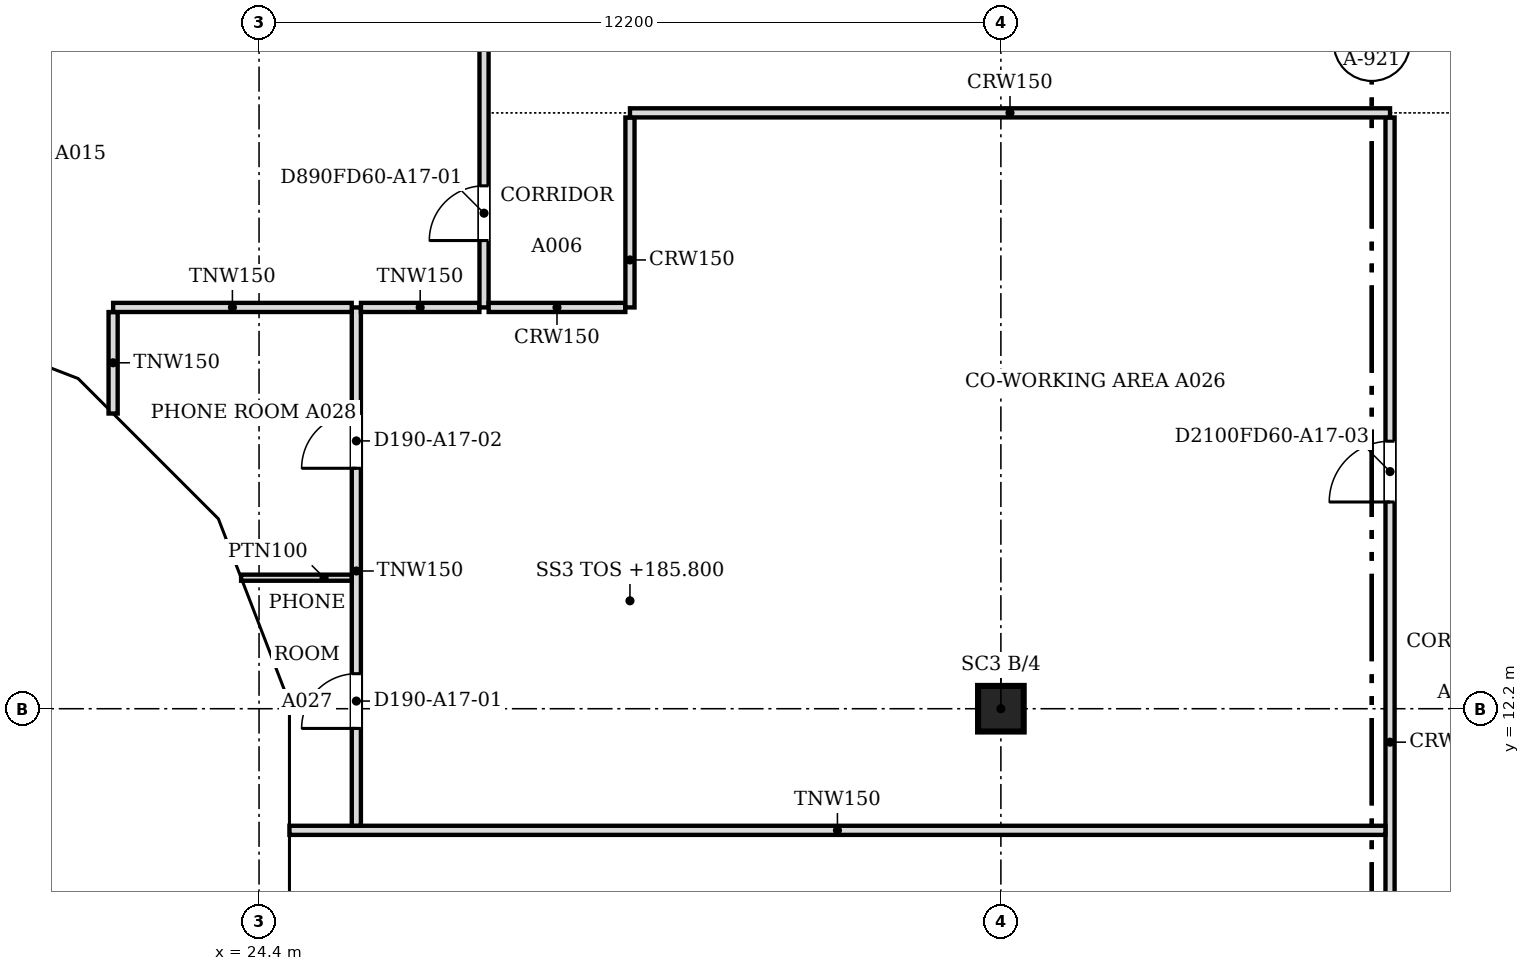
"""IFC4 building model, lengths in metres.
Left out: names, types, materials, properties, quantities, classifications, styles, units other than length and angle.
Written with IfcOpenShell. Run it as: python <this file> out.ifc"""

import sys

from ifc_helpers import new_model, si_unit, direction, frame, frame_2d, origin, origin_2d, place, context, subcontext, project, spatial, polyline, rectangle, outline, extrude, faceted_brep, source, transform, mapped, element, fill, save


model = new_model("IFC4")
c1 = context("Model", 3, precision=1e-05, world=origin(), true_north=direction((0.0, 1.0)))
c2 = subcontext(c1, "Body", "Model", "MODEL_VIEW")
j1 = project(units=[si_unit("LENGTHUNIT", "METRE"), si_unit("PLANEANGLEUNIT", "RADIAN")], contexts=[c1])
p1 = place(None, origin())
s1 = spatial("IfcSite", under=j1, at=p1, CompositionType="ELEMENT")
p2 = place(p1, origin())
s2 = spatial("IfcBuilding", under=s1, at=p2, CompositionType="ELEMENT")
p3 = place(p2, frame((0.0, 0.0, 185.8)))
s3 = spatial("IfcBuildingStorey", under=s2, at=p3, CompositionType="ELEMENT", Elevation=185.8)
p4 = place(p3, frame((36.6, 12.2, 0.0), z_axis=(0.0, 0.0, 1.0), x_axis=(1.0, 0.0, 0.0)))
e1 = element("IfcColumn", 1, at=p4, inside=s3, PredefinedType="COLUMN", context=c2, shape_type="SweptSolid", body=[
    extrude(rectangle(XDim=0.75, YDim=0.75, at=origin_2d()), origin(), (0.0, 0.0, 1.0), 3.6),
])
m1 = source(origin(), c2, "Body", "Brep", [
    faceted_brep([(0.093, -0.25, 0.056), (3.143, -0.25, 3.736), (3.143, -0.25, 3.864), (0.093, -0.25, 7.544), (0.0, 0.25, 7.543), (0.047, 0.25, 7.6), (3.196, 0.25, 3.8), (0.047, 0.25, 0.0), (0.0, 0.25, 0.057), (3.196, -0.0, 3.8), (0.047, 0.0, 0.0), (0.047, 0.0, 7.6)], [[[0, 1, 2, 3]], [[4, 5, 6, 7, 8]], [[7, 6, 9, 1, 0, 10]], [[6, 5, 11, 3, 2, 9]], [[5, 4, 11]], [[8, 7, 10]], [[8, 10, 0, 3, 11, 4]], [[1, 9, 2]]]),
])
p5 = place(p3, frame((18.303, 18.567, -3.8), z_axis=(0.0, 0.0, 1.0), x_axis=(0.932978940178, -0.359930961693, 0.0)))
e2 = element("IfcWall", 2, at=p5, inside=s3, PredefinedType="SOLIDWALL", context=c2, shape_type="MappedRepresentation", body=[
    mapped(m1, transform((0.0, 0.0, 0.0), scale=1.0)),
])
m2 = source(origin(), c2, "Body", "SweptSolid", [
    extrude(outline(polyline([(0.247, 0.633), (2.871, 3.8), (0.247, 6.967), (0.247, 0.633)])), frame((0.0, 0.26, 0.0), z_axis=(0.0, -1.0, 0.0), x_axis=(1.0, 0.0, 0.0)), (0.0, 0.0, 1.0), 0.52),
])
p6 = place(p5, origin())
e3 = element("IfcOpeningElement", 3, at=p6, cuts=e2, PredefinedType="OPENING", context=c2, shape_type="MappedRepresentation", body=[
    mapped(m2, transform((0.0, 0.0, 0.0), scale=1.0)),
])
m3 = source(origin(), c2, "Body", "Brep", [
    faceted_brep([(3.103, -0.25, 7.536), (0.053, -0.25, 3.864), (0.053, -0.25, 3.736), (3.103, -0.25, 0.064), (0.0, 0.25, 3.8), (3.156, 0.25, 7.6), (3.209, 0.25, 7.536), (3.209, 0.25, 0.064), (3.156, 0.25, 0.0), (3.156, -0.0, 0.0), (3.156, -0.0, 7.6), (0.0, 0.0, 3.8)], [[[0, 1, 2, 3]], [[4, 5, 6, 7, 8]], [[8, 7, 9]], [[6, 5, 10]], [[5, 4, 11, 1, 0, 10]], [[4, 8, 9, 3, 2, 11]], [[11, 2, 1]], [[3, 9, 7, 6, 10, 0]]]),
])
p7 = place(p3, frame((21.285, 17.417, -3.8), z_axis=(0.0, 0.0, 1.0), x_axis=(0.707106781187, -0.707106781187, 0.0)))
e4 = element("IfcWall", 4, at=p7, inside=s3, PredefinedType="SOLIDWALL", context=c2, shape_type="MappedRepresentation", body=[
    mapped(m3, transform((0.0, 0.0, 0.0), scale=1.0)),
])
m4 = source(origin(), c2, "Body", "SweptSolid", [
    extrude(outline(polyline([(2.956, 6.968), (0.325, 3.8), (2.956, 0.632), (2.956, 6.968)])), frame((0.0, 0.26, 0.0), z_axis=(0.0, -1.0, 0.0), x_axis=(1.0, 0.0, 0.0)), (0.0, 0.0, 1.0), 0.52),
])
p8 = place(p7, origin())
e5 = element("IfcOpeningElement", 5, at=p8, cuts=e4, PredefinedType="OPENING", context=c2, shape_type="MappedRepresentation", body=[
    mapped(m4, transform((0.0, 0.0, 0.0), scale=1.0)),
])
m5 = source(origin(), c2, "Body", "Brep", [
    faceted_brep([(0.106, -0.25, 0.064), (3.156, -0.25, 3.744), (3.156, -0.25, 3.856), (0.106, -0.25, 7.536), (0.0, 0.25, 7.536), (0.053, 0.25, 7.6), (3.202, 0.25, 3.8), (0.053, 0.25, 0.0), (0.0, 0.25, 0.064), (3.202, -0.0, 3.8), (0.053, 0.0, 0.0), (0.053, 0.0, 7.6)], [[[0, 1, 2, 3]], [[4, 5, 6, 7, 8]], [[7, 6, 9, 1, 0, 10]], [[6, 5, 11, 3, 2, 9]], [[5, 4, 11]], [[8, 7, 10]], [[8, 10, 0, 3, 11, 4]], [[1, 9, 2]]]),
])
p9 = place(p3, frame((23.497, 15.234, -3.8), z_axis=(0.0, 0.0, 1.0), x_axis=(0.359913782069, -0.932985567668, 0.0)))
e6 = element("IfcWall", 6, at=p9, inside=s3, PredefinedType="SOLIDWALL", context=c2, shape_type="MappedRepresentation", body=[
    mapped(m5, transform((0.0, 0.0, 0.0), scale=1.0)),
])
m6 = source(origin(), c2, "Body", "SweptSolid", [
    extrude(outline(polyline([(0.253, 0.633), (2.878, 3.8), (0.253, 6.967), (0.253, 0.633)])), frame((0.0, 0.26, 0.0), z_axis=(0.0, -1.0, 0.0), x_axis=(1.0, 0.0, 0.0)), (0.0, 0.0, 1.0), 0.52),
])
p10 = place(p9, origin())
e7 = element("IfcOpeningElement", 7, at=p10, cuts=e6, PredefinedType="OPENING", context=c2, shape_type="MappedRepresentation", body=[
    mapped(m6, transform((0.0, 0.0, 0.0), scale=1.0)),
])
m7 = source(origin(), c2, "Body", "Brep", [
    faceted_brep([(3.096, -0.25, 0.0), (6.1, -0.25, 3.8), (3.096, -0.25, 7.6), (0.047, -0.25, 3.857), (0.047, -0.25, 3.743), (0.0, 0.25, 3.8), (3.096, 0.25, 7.6), (6.053, 0.25, 3.859), (6.053, 0.25, 3.741), (3.096, 0.25, 0.0), (6.1, -0.0, 3.8), (0.0, 0.0, 3.8)], [[[0, 1, 2, 3, 4]], [[5, 6, 7, 8, 9]], [[9, 8, 10, 1, 0]], [[7, 6, 2, 1, 10]], [[6, 5, 11, 3, 2]], [[5, 9, 0, 4, 11]], [[11, 4, 3]], [[10, 8, 7]]]),
])
p11 = place(p3, frame((24.65, 12.247, -3.8), z_axis=(0.0, 0.0, 1.0), x_axis=(0.0, -1.0, 0.0)))
e8 = element("IfcWall", 8, at=p11, inside=s3, PredefinedType="SOLIDWALL", context=c2, shape_type="MappedRepresentation", body=[
    mapped(m7, transform((0.0, 0.0, 0.0), scale=1.0)),
])
m8 = source(origin(), c2, "Body", "SweptSolid", [
    extrude(outline(polyline([(3.094, 0.399), (5.781, 3.8), (3.094, 7.201), (0.323, 3.8), (3.094, 0.399)])), frame((0.0, 0.26, 0.0), z_axis=(0.0, -1.0, 0.0), x_axis=(1.0, 0.0, 0.0)), (0.0, 0.0, 1.0), 0.52),
])
p12 = place(p11, origin())
e9 = element("IfcOpeningElement", 9, at=p12, cuts=e8, PredefinedType="OPENING", context=c2, shape_type="MappedRepresentation", body=[
    mapped(m8, transform((0.0, 0.0, 0.0), scale=1.0)),
])
p13 = place(p2, frame((0.0, 0.0, 189.6)))
s4 = spatial("IfcBuildingStorey", under=s2, at=p13, CompositionType="ELEMENT", Elevation=189.6)
m9 = source(origin(), c2, "Body", "Brep", [
    faceted_brep([(3.096, -0.25, 7.536), (0.047, -0.25, 3.856), (0.047, -0.25, 3.744), (3.096, -0.25, 0.064), (0.0, 0.25, 3.8), (3.149, 0.25, 7.6), (3.202, 0.25, 7.536), (3.202, 0.25, 0.064), (3.149, 0.25, 0.0), (3.149, -0.0, 0.0), (3.149, -0.0, 7.6), (0.0, 0.0, 3.8)], [[[0, 1, 2, 3]], [[4, 5, 6, 7, 8]], [[8, 7, 9]], [[6, 5, 10]], [[5, 4, 11, 1, 0, 10]], [[4, 8, 9, 3, 2, 11]], [[2, 1, 11]], [[3, 9, 7, 6, 10, 0]]]),
])
p14 = place(p13, frame((18.346, 18.55, -3.8), z_axis=(0.0, 0.0, 1.0), x_axis=(0.932985567668, -0.359913782069, 0.0)))
e10 = element("IfcWall", 10, at=p14, inside=s4, PredefinedType="SOLIDWALL", context=c2, shape_type="MappedRepresentation", body=[
    mapped(m9, transform((0.0, 0.0, 0.0), scale=1.0)),
])
m10 = source(origin(), c2, "Body", "SweptSolid", [
    extrude(outline(polyline([(2.949, 6.967), (0.325, 3.8), (2.949, 0.633), (2.949, 6.967)])), frame((0.0, 0.26, 0.0), z_axis=(0.0, -1.0, 0.0), x_axis=(1.0, 0.0, 0.0)), (0.0, 0.0, 1.0), 0.52),
])
p15 = place(p14, origin())
e11 = element("IfcOpeningElement", 11, at=p15, cuts=e10, PredefinedType="OPENING", context=c2, shape_type="MappedRepresentation", body=[
    mapped(m10, transform((0.0, 0.0, 0.0), scale=1.0)),
])
m11 = source(origin(), c2, "Body", "Brep", [
    faceted_brep([(0.106, -0.25, 0.064), (3.156, -0.25, 3.736), (3.156, -0.25, 3.864), (0.106, -0.25, 7.536), (0.0, 0.25, 7.536), (0.053, 0.25, 7.6), (3.209, 0.25, 3.8), (0.053, 0.25, 0.0), (0.0, 0.25, 0.064), (3.209, -0.0, 3.8), (0.053, 0.0, 0.0), (0.053, 0.0, 7.6)], [[[0, 1, 2, 3]], [[4, 5, 6, 7, 8]], [[7, 6, 9, 1, 0, 10]], [[6, 5, 11, 3, 2, 9]], [[5, 4, 11]], [[8, 7, 10]], [[8, 10, 0, 3, 11, 4]], [[1, 9, 2]]]),
])
p16 = place(p13, frame((21.248, 17.454, -3.8), z_axis=(0.0, 0.0, 1.0), x_axis=(0.707106781187, -0.707106781187, 0.0)))
e12 = element("IfcWall", 12, at=p16, inside=s4, PredefinedType="SOLIDWALL", context=c2, shape_type="MappedRepresentation", body=[
    mapped(m11, transform((0.0, 0.0, 0.0), scale=1.0)),
])
m12 = source(origin(), c2, "Body", "SweptSolid", [
    extrude(outline(polyline([(0.253, 0.632), (2.884, 3.8), (0.253, 6.968), (0.253, 0.632)])), frame((0.0, 0.26, 0.0), z_axis=(0.0, -1.0, 0.0), x_axis=(1.0, 0.0, 0.0)), (0.0, 0.0, 1.0), 0.52),
])
p17 = place(p16, origin())
e13 = element("IfcOpeningElement", 13, at=p17, cuts=e12, PredefinedType="OPENING", context=c2, shape_type="MappedRepresentation", body=[
    mapped(m12, transform((0.0, 0.0, 0.0), scale=1.0)),
])
m13 = source(origin(), c2, "Body", "Brep", [
    faceted_brep([(3.103, -0.25, 7.544), (0.053, -0.25, 3.864), (0.053, -0.25, 3.736), (3.103, -0.25, 0.056), (0.0, 0.25, 3.8), (3.149, 0.25, 7.6), (3.196, 0.25, 7.543), (3.196, 0.25, 0.057), (3.149, 0.25, 0.0), (3.149, -0.0, 0.0), (3.149, -0.0, 7.6), (0.0, 0.0, 3.8)], [[[0, 1, 2, 3]], [[4, 5, 6, 7, 8]], [[8, 7, 9]], [[6, 5, 10]], [[5, 4, 11, 1, 0, 10]], [[4, 8, 9, 3, 2, 11]], [[2, 1, 11]], [[3, 9, 7, 6, 10, 0]]]),
])
p18 = place(p13, frame((23.517, 15.185, -3.8), z_axis=(0.0, 0.0, 1.0), x_axis=(0.359864468756, -0.933004589553, 0.0)))
e14 = element("IfcWall", 14, at=p18, inside=s4, PredefinedType="SOLIDWALL", context=c2, shape_type="MappedRepresentation", body=[
    mapped(m13, transform((0.0, 0.0, 0.0), scale=1.0)),
])
p19 = place(p18, origin())
e15 = element("IfcOpeningElement", 15, at=p19, cuts=e14, PredefinedType="OPENING", context=c2, shape_type="MappedRepresentation", body=[
    mapped(m10, transform((0.0, 0.0, 0.0), scale=1.0)),
])
m14 = source(origin(), c2, "Body", "Brep", [
    faceted_brep([(0.093, -0.25, 0.057), (3.143, -0.25, 3.8), (0.093, -0.25, 7.543), (0.0, 0.25, 7.544), (0.047, 0.25, 7.6), (3.143, 0.25, 3.8), (0.047, 0.25, 0.0), (0.0, 0.25, 0.056), (0.047, 0.0, 0.0), (0.047, 0.0, 7.6)], [[[0, 1, 2]], [[3, 4, 5, 6, 7]], [[6, 5, 1, 0, 8]], [[5, 4, 9, 2, 1]], [[4, 3, 9]], [[7, 6, 8]], [[7, 8, 0, 2, 9, 3]]]),
])
p20 = place(p13, frame((24.65, 12.293, -3.8), z_axis=(0.0, 0.0, 1.0), x_axis=(0.0, -1.0, 0.0)))
e16 = element("IfcWall", 16, at=p20, inside=s4, PredefinedType="SOLIDWALL", context=c2, shape_type="MappedRepresentation", body=[
    mapped(m14, transform((0.0, 0.0, 0.0), scale=1.0)),
])
m15 = source(origin(), c2, "Body", "SweptSolid", [
    extrude(outline(polyline([(0.247, 0.641), (2.821, 3.8), (0.247, 6.959), (0.247, 0.641)])), frame((0.0, 0.26, 0.0), z_axis=(0.0, -1.0, 0.0), x_axis=(1.0, 0.0, 0.0)), (0.0, 0.0, 1.0), 0.52),
])
p21 = place(p20, origin())
e17 = element("IfcOpeningElement", 17, at=p21, cuts=e16, PredefinedType="OPENING", context=c2, shape_type="MappedRepresentation", body=[
    mapped(m15, transform((0.0, 0.0, 0.0), scale=1.0)),
])
p22 = place(p3, frame((43.0, 0.5, 0.0), z_axis=(0.0, 0.0, 1.0), x_axis=(0.0, 1.0, 0.0)))
e18 = element("IfcWall", 18, at=p22, inside=s3, PredefinedType="PARTITIONING", context=c2, shape_type="SweptSolid", body=[
    extrude(rectangle(XDim=21.424, YDim=0.15, at=frame_2d((10.712, 0.0))), origin(), (0.0, 0.0, 1.0), 3.067),
])
m16 = source(origin(), c2, "Body", "SweptSolid", [
    extrude(rectangle(XDim=1.0, YDim=2.1, at=frame_2d((0.5, 1.05))), frame((0.0, 0.085, 0.0), z_axis=(0.0, -1.0, 0.0), x_axis=(1.0, 0.0, 0.0)), (0.0, 0.0, 1.0), 0.17),
])
p23 = place(p22, frame((6.2, 0.0, 0.0)))
e19 = element("IfcOpeningElement", 19, at=p23, cuts=e18, PredefinedType="OPENING", context=c2, shape_type="MappedRepresentation", body=[
    mapped(m16, transform((0.0, 0.0, 0.0), scale=1.0)),
])
p24 = place(p22, frame((15.1, 0.0, 0.0)))
e20 = element("IfcOpeningElement", 20, at=p24, cuts=e18, PredefinedType="OPENING", context=c2, shape_type="MappedRepresentation", body=[
    mapped(m16, transform((0.0, 0.0, 0.0), scale=1.0)),
])
p25 = place(p3, frame((24.9, 10.2, 0.0), z_axis=(0.0, 0.0, 1.0), x_axis=(1.0, 0.0, 0.0)))
e21 = element("IfcWall", 21, at=p25, inside=s3, PredefinedType="PARTITIONING", context=c2, shape_type="SweptSolid", body=[
    extrude(rectangle(XDim=18.024, YDim=0.15, at=frame_2d((9.012, 0.0))), origin(), (0.0, 0.0, 1.0), 3.067),
])
p26 = place(p3, frame((26.0, 10.276, 0.0), z_axis=(0.0, 0.0, 1.0), x_axis=(0.0, 1.0, 0.0)))
e22 = element("IfcWall", 22, at=p26, inside=s3, PredefinedType="PARTITIONING", context=c2, shape_type="SweptSolid", body=[
    extrude(rectangle(XDim=8.524, YDim=0.15, at=frame_2d((4.262, 0.0))), origin(), (0.0, 0.0, 1.0), 3.067),
])
m17 = source(origin(), c2, "Body", "SweptSolid", [
    extrude(rectangle(XDim=0.9, YDim=2.1, at=frame_2d((0.45, 1.05))), frame((0.0, 0.085, 0.0), z_axis=(0.0, -1.0, 0.0), x_axis=(1.0, 0.0, 0.0)), (0.0, 0.0, 1.0), 0.17),
])
p27 = place(p26, frame((1.6, 0.0, 0.0)))
e23 = element("IfcOpeningElement", 23, at=p27, cuts=e22, PredefinedType="OPENING", context=c2, shape_type="MappedRepresentation", body=[
    mapped(m17, transform((0.0, 0.0, 0.0), scale=1.0)),
])
p28 = place(p26, frame((5.879, 0.0, 0.0)))
e24 = element("IfcOpeningElement", 24, at=p28, cuts=e22, PredefinedType="OPENING", context=c2, shape_type="MappedRepresentation", body=[
    mapped(m17, transform((0.0, 0.0, 0.0), scale=1.0)),
])
p29 = place(p3, frame((24.105, 14.355, 0.0), z_axis=(0.0, 0.0, 1.0), x_axis=(1.0, 0.0, 0.0)))
e25 = element("IfcWall", 25, at=p29, inside=s3, PredefinedType="PARTITIONING", context=c2, shape_type="SweptSolid", body=[
    extrude(rectangle(XDim=1.819, YDim=0.1, at=frame_2d((0.91, 0.0))), origin(), (0.0, 0.0, 1.0), 3.067),
])
p30 = place(p3, frame((22.0, 17.055, 0.0), z_axis=(0.0, 0.0, 1.0), x_axis=(0.0, 1.0, 0.0)))
e26 = element("IfcWall", 26, at=p30, inside=s3, PredefinedType="PARTITIONING", context=c2, shape_type="SweptSolid", body=[
    extrude(rectangle(XDim=1.669, YDim=0.15, at=frame_2d((0.834, 0.0))), origin(), (0.0, 0.0, 1.0), 3.067),
])
p31 = place(p3, frame((22.0, 18.8, 0.0), z_axis=(0.0, 0.0, 1.0), x_axis=(1.0, 0.0, 0.0)))
e27 = element("IfcWall", 27, at=p31, inside=s3, PredefinedType="PARTITIONING", context=c2, shape_type="SweptSolid", body=[
    extrude(rectangle(XDim=3.924, YDim=0.15, at=frame_2d((1.962, 0.0))), origin(), (0.0, 0.0, 1.0), 3.067),
])
p32 = place(p3, frame((26.076, 18.8, 0.0), z_axis=(0.0, 0.0, 1.0), x_axis=(1.0, 0.0, 0.0)))
e28 = element("IfcWall", 28, at=p32, inside=s3, PredefinedType="PARTITIONING", context=c2, shape_type="SweptSolid", body=[
    extrude(rectangle(XDim=1.948, YDim=0.15, at=frame_2d((0.974, 0.0))), origin(), (0.0, 0.0, 1.0), 3.067),
])
p33 = place(p3, frame((28.1, 18.8, 0.0), z_axis=(0.0, 0.0, 1.0), x_axis=(0.0, 1.0, 0.0)))
e29 = element("IfcWall", 29, at=p33, inside=s3, PredefinedType="PARTITIONING", context=c2, shape_type="SweptSolid", body=[
    extrude(rectangle(XDim=26.424, YDim=0.15, at=frame_2d((13.212, 0.0))), origin(), (0.0, 0.0, 1.0), 3.067),
])
p34 = place(p33, frame((1.1, 0.0, 0.0)))
e30 = element("IfcOpeningElement", 30, at=p34, cuts=e29, PredefinedType="OPENING", context=c2, shape_type="MappedRepresentation", body=[
    mapped(m17, transform((0.0, 0.0, 0.0), scale=1.0)),
])
p35 = place(p33, frame((14.301, 0.0, 0.0)))
e31 = element("IfcOpeningElement", 31, at=p35, cuts=e29, PredefinedType="OPENING", context=c2, shape_type="MappedRepresentation", body=[
    mapped(m17, transform((0.0, 0.0, 0.0), scale=1.0)),
])
p36 = place(p33, frame((8.2, 0.0, 0.0)))
e32 = element("IfcOpeningElement", 32, at=p36, cuts=e29, PredefinedType="OPENING", context=c2, shape_type="MappedRepresentation", body=[
    mapped(m17, transform((0.0, 0.0, 0.0), scale=1.0)),
])
p37 = place(p33, frame((21.6, 0.0, 0.0)))
e33 = element("IfcOpeningElement", 33, at=p37, cuts=e29, PredefinedType="OPENING", context=c2, shape_type="MappedRepresentation", body=[
    mapped(m16, transform((0.0, 0.0, 0.0), scale=1.0)),
])
p38 = place(p3, frame((28.176, 18.8, 0.0), z_axis=(0.0, 0.0, 1.0), x_axis=(1.0, 0.0, 0.0)))
e34 = element("IfcWall", 34, at=p38, inside=s3, PredefinedType="PARTITIONING", context=c2, shape_type="SweptSolid", body=[
    extrude(rectangle(XDim=2.248, YDim=0.15, at=frame_2d((1.124, 0.0))), origin(), (0.0, 0.0, 1.0), 3.067),
])
p39 = place(p3, frame((30.5, 18.8, 0.0), z_axis=(0.0, 0.0, 1.0), x_axis=(0.0, 1.0, 0.0)))
e35 = element("IfcWall", 35, at=p39, inside=s3, PredefinedType="PARTITIONING", context=c2, shape_type="SweptSolid", body=[
    extrude(rectangle(XDim=3.124, YDim=0.15, at=frame_2d((1.562, 0.0))), origin(), (0.0, 0.0, 1.0), 3.067),
])
p40 = place(p3, frame((30.5, 22.0, 0.0), z_axis=(0.0, 0.0, 1.0), x_axis=(1.0, 0.0, 0.0)))
e36 = element("IfcWall", 36, at=p40, inside=s3, PredefinedType="PARTITIONING", context=c2, shape_type="SweptSolid", body=[
    extrude(rectangle(XDim=12.5, YDim=0.15, at=frame_2d((6.25, 0.0))), origin(), (0.0, 0.0, 1.0), 3.067),
])
m18 = source(origin(), c2, "Body", "SweptSolid", [
    extrude(rectangle(XDim=0.9, YDim=2.1, at=frame_2d((0.45, 1.05))), frame((0.0, 0.025, 0.0), z_axis=(0.0, -1.0, 0.0), x_axis=(1.0, 0.0, 0.0)), (0.0, 0.0, 1.0), 0.05),
])
p41 = place(p34, origin())
e37 = element("IfcDoor", 37, at=p41, inside=s3, OperationType="SINGLE_SWING_LEFT", PredefinedType="DOOR", context=c2, shape_type="MappedRepresentation", body=[
    mapped(m18, transform((0.0, 0.0, 0.0), scale=1.0)),
])
fill(e30, e37)
p42 = place(p27, origin())
e38 = element("IfcDoor", 38, at=p42, inside=s3, OperationType="SINGLE_SWING_LEFT", PredefinedType="DOOR", context=c2, shape_type="MappedRepresentation", body=[
    mapped(m18, transform((0.0, 0.0, 0.0), scale=1.0)),
])
fill(e23, e38)
p43 = place(p28, origin())
e39 = element("IfcDoor", 39, at=p43, inside=s3, OperationType="SINGLE_SWING_LEFT", PredefinedType="DOOR", context=c2, shape_type="MappedRepresentation", body=[
    mapped(m18, transform((0.0, 0.0, 0.0), scale=1.0)),
])
fill(e24, e39)
m19 = source(origin(), c2, "Body", "SweptSolid", [
    extrude(rectangle(XDim=1.0, YDim=2.1, at=frame_2d((0.5, 1.05))), frame((0.0, 0.025, 0.0), z_axis=(0.0, -1.0, 0.0), x_axis=(1.0, 0.0, 0.0)), (0.0, 0.0, 1.0), 0.05),
])
p44 = place(p24, origin())
e40 = element("IfcDoor", 40, at=p44, inside=s3, OperationType="SINGLE_SWING_LEFT", PredefinedType="DOOR", context=c2, shape_type="MappedRepresentation", body=[
    mapped(m19, transform((0.0, 0.0, 0.0), scale=1.0)),
])
fill(e20, e40)
save(model, sys.argv[1])
